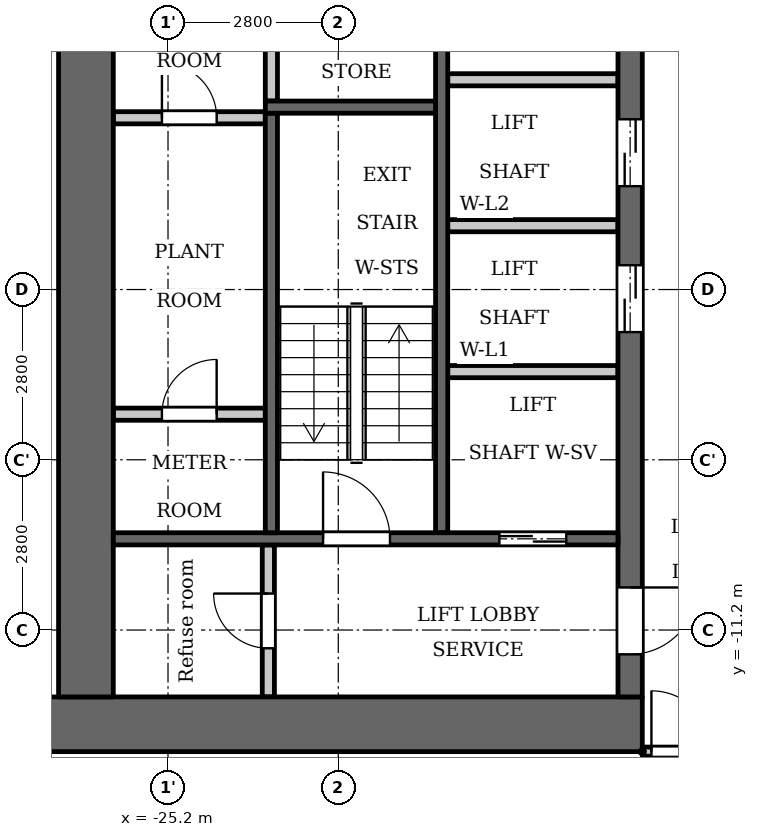
"""IFC4 building model, lengths in metres.
Left out: names, types, materials, properties, quantities, classifications, styles, units other than length and angle.
Written with IfcOpenShell. Run it as: python <this file> out.ifc"""

import sys

from ifc_helpers import new_model, si_unit, direction, frame, frame_2d, origin, place, context, subcontext, project, spatial, rectangle, extrude, element, fill, save


model = new_model("IFC4")
c1 = context("Model", 3, precision=1e-05, world=origin(), true_north=direction((0.0, 1.0)))
c2 = subcontext(c1, "Body", "Model", "MODEL_VIEW")
j1 = project(units=[si_unit("LENGTHUNIT", "METRE"), si_unit("PLANEANGLEUNIT", "RADIAN")], contexts=[c1])
p1 = place(None, origin())
s1 = spatial("IfcSite", under=j1, at=p1, CompositionType="ELEMENT")
p2 = place(p1, origin())
s2 = spatial("IfcBuilding", under=s1, at=p2, CompositionType="ELEMENT")
p3 = place(p2, frame((0.0, 0.0, 86.8)))
s3 = spatial("IfcBuildingStorey", under=s2, at=p3, CompositionType="ELEMENT", Elevation=86.8)
p4 = place(p3, frame((-23.5, -2.5, 0.0), z_axis=(0.0, 0.0, 1.0), x_axis=(0.0, 1.0, 0.0)))
e1 = element("IfcWall", 1, at=p4, inside=s3, PredefinedType="PARTITIONING", context=c2, shape_type="SweptSolid", body=[
    extrude(rectangle(XDim=2.65, YDim=0.2, at=frame_2d((1.325, 0.0))), origin(), (0.0, 0.0, 1.0), 3.2),
])
p5 = place(p3, frame((-20.7, -9.6, 0.0), z_axis=(0.0, 0.0, 1.0), x_axis=(0.0, 1.0, 0.0)))
e2 = element("IfcWall", 2, at=p5, inside=s3, PredefinedType="SHEAR", context=c2, shape_type="SweptSolid", body=[
    extrude(rectangle(XDim=9.75, YDim=0.2, at=frame_2d((4.875, 0.0))), origin(), (0.0, 0.0, 1.0), 3.2),
])
p6 = place(p3, frame((-17.4, -12.75, 0.0), z_axis=(0.0, 0.0, 1.0), x_axis=(-1.0, 0.0, 0.0)))
e3 = element("IfcWall", 3, at=p6, inside=s3, PredefinedType="SHEAR", context=c2, shape_type="SweptSolid", body=[
    extrude(rectangle(XDim=10.4, YDim=0.9, at=frame_2d((5.2, 0.0))), origin(), (0.0, 0.0, 1.0), 3.2),
])
p7 = place(p3, frame((-17.6, -12.3, 0.0), z_axis=(0.0, 0.0, 1.0), x_axis=(0.0, 1.0, 0.0)))
e4 = element("IfcWall", 4, at=p7, inside=s3, PredefinedType="SHEAR", context=c2, shape_type="SweptSolid", body=[
    extrude(rectangle(XDim=24.6, YDim=0.4, at=frame_2d((12.3, 0.0))), origin(), (0.0, 0.0, 1.0), 3.2),
])
p8 = place(p7, frame((6.0, 0.0, 0.0)))
e5 = element("IfcOpeningElement", 5, at=p8, cuts=e4, PredefinedType="OPENING", context=c2, shape_type="SweptSolid", body=[
    extrude(rectangle(XDim=1.1, YDim=2.1, at=frame_2d((0.55, 1.05))), frame((0.0, 0.21, 0.0), z_axis=(0.0, -1.0, 0.0), x_axis=(1.0, 0.0, 0.0)), (0.0, 0.0, 1.0), 0.42),
])
p9 = place(p7, frame((8.4, 0.0, 0.0)))
e6 = element("IfcOpeningElement", 6, at=p9, cuts=e4, PredefinedType="OPENING", context=c2, shape_type="SweptSolid", body=[
    extrude(rectangle(XDim=1.1, YDim=2.1, at=frame_2d((0.55, 1.05))), frame((0.0, 0.21, 0.0), z_axis=(0.0, -1.0, 0.0), x_axis=(1.0, 0.0, 0.0)), (0.0, 0.0, 1.0), 0.42),
])
p10 = place(p7, frame((10.8, 0.0, 0.0)))
e7 = element("IfcOpeningElement", 7, at=p10, cuts=e4, PredefinedType="OPENING", context=c2, shape_type="SweptSolid", body=[
    extrude(rectangle(XDim=1.1, YDim=2.1, at=frame_2d((0.55, 1.05))), frame((0.0, 0.21, 0.0), z_axis=(0.0, -1.0, 0.0), x_axis=(1.0, 0.0, 0.0)), (0.0, 0.0, 1.0), 0.42),
])
p11 = place(p7, frame((16.75, 0.0, 0.0)))
e8 = element("IfcOpeningElement", 8, at=p11, cuts=e4, PredefinedType="OPENING", context=c2, shape_type="SweptSolid", body=[
    extrude(rectangle(XDim=0.9, YDim=2.1, at=frame_2d((0.45, 1.05))), frame((0.0, 0.21, 0.0), z_axis=(0.0, -1.0, 0.0), x_axis=(1.0, 0.0, 0.0)), (0.0, 0.0, 1.0), 0.42),
])
p12 = place(p7, frame((22.8, 0.0, 0.0)))
e9 = element("IfcOpeningElement", 9, at=p12, cuts=e4, PredefinedType="OPENING", context=c2, shape_type="SweptSolid", body=[
    extrude(rectangle(XDim=1.1, YDim=2.1, at=frame_2d((0.55, 1.05))), frame((0.0, 0.21, 0.0), z_axis=(0.0, -1.0, 0.0), x_axis=(1.0, 0.0, 0.0)), (0.0, 0.0, 1.0), 0.42),
])
p13 = place(p7, frame((0.7, 0.0, 0.0)))
e10 = element("IfcOpeningElement", 10, at=p13, cuts=e4, PredefinedType="OPENING", context=c2, shape_type="SweptSolid", body=[
    extrude(rectangle(XDim=1.1, YDim=2.1, at=frame_2d((0.55, 1.05))), frame((0.0, 0.21, 0.0), z_axis=(0.0, -1.0, 0.0), x_axis=(1.0, 0.0, 0.0)), (0.0, 0.0, 1.0), 0.42),
])
p14 = place(p7, frame((12.775, 0.0, 0.0)))
e11 = element("IfcOpeningElement", 11, at=p14, cuts=e4, PredefinedType="OPENING", context=c2, shape_type="SweptSolid", body=[
    extrude(rectangle(XDim=1.8, YDim=2.1, at=frame_2d((0.9, 1.05))), frame((0.0, 0.21, 0.0), z_axis=(0.0, -1.0, 0.0), x_axis=(1.0, 0.0, 0.0)), (0.0, 0.0, 1.0), 0.42),
])
p15 = place(p3, frame((-26.55, -12.3, 0.0), z_axis=(0.0, 0.0, 1.0), x_axis=(0.0, 1.0, 0.0)))
e12 = element("IfcWall", 12, at=p15, inside=s3, PredefinedType="SHEAR", context=c2, shape_type="SweptSolid", body=[
    extrude(rectangle(XDim=24.6, YDim=0.9, at=frame_2d((12.3, 0.0))), origin(), (0.0, 0.0, 1.0), 3.2),
])
p16 = place(p3, frame((-23.55, -12.3, 0.0), z_axis=(0.0, 0.0, 1.0), x_axis=(0.0, 1.0, 0.0)))
e13 = element("IfcWall", 13, at=p16, inside=s3, PredefinedType="PARTITIONING", context=c2, shape_type="SweptSolid", body=[
    extrude(rectangle(XDim=2.5, YDim=0.2, at=frame_2d((1.25, 0.0))), origin(), (0.0, 0.0, 1.0), 3.2),
])
p17 = place(p16, frame((0.8, 0.0, 0.0)))
e14 = element("IfcOpeningElement", 14, at=p17, cuts=e13, PredefinedType="OPENING", context=c2, shape_type="SweptSolid", body=[
    extrude(rectangle(XDim=0.9, YDim=2.1, at=frame_2d((0.45, 1.05))), frame((0.0, 0.11, 0.0), z_axis=(0.0, -1.0, 0.0), x_axis=(1.0, 0.0, 0.0)), (0.0, 0.0, 1.0), 0.22),
])
p18 = place(p3, frame((-23.6, -7.65, 0.0), z_axis=(0.0, 0.0, 1.0), x_axis=(-1.0, 0.0, 0.0)))
e15 = element("IfcWall", 15, at=p18, inside=s3, PredefinedType="PARTITIONING", context=c2, shape_type="SweptSolid", body=[
    extrude(rectangle(XDim=2.5, YDim=0.2, at=frame_2d((1.25, 0.0))), origin(), (0.0, 0.0, 1.0), 3.2),
])
p19 = place(p18, frame((0.8, 0.0, 0.0)))
e16 = element("IfcOpeningElement", 16, at=p19, cuts=e15, PredefinedType="OPENING", context=c2, shape_type="SweptSolid", body=[
    extrude(rectangle(XDim=0.9, YDim=2.1, at=frame_2d((0.45, 1.05))), frame((0.0, 0.11, 0.0), z_axis=(0.0, -1.0, 0.0), x_axis=(1.0, 0.0, 0.0)), (0.0, 0.0, 1.0), 0.22),
])
p20 = place(p3, frame((-23.6, -2.775, 0.0), z_axis=(0.0, 0.0, 1.0), x_axis=(-1.0, 0.0, 0.0)))
e17 = element("IfcWall", 17, at=p20, inside=s3, PredefinedType="PARTITIONING", context=c2, shape_type="SweptSolid", body=[
    extrude(rectangle(XDim=2.5, YDim=0.2, at=frame_2d((1.25, 0.0))), origin(), (0.0, 0.0, 1.0), 3.2),
])
p21 = place(p20, frame((0.8, 0.0, 0.0)))
e18 = element("IfcOpeningElement", 18, at=p21, cuts=e17, PredefinedType="OPENING", context=c2, shape_type="SweptSolid", body=[
    extrude(rectangle(XDim=0.9, YDim=2.1, at=frame_2d((0.45, 1.05))), frame((0.0, 0.11, 0.0), z_axis=(0.0, -1.0, 0.0), x_axis=(1.0, 0.0, 0.0)), (0.0, 0.0, 1.0), 0.22),
])
p22 = place(p3, frame((-17.8, -9.7, 0.0), z_axis=(0.0, 0.0, 1.0), x_axis=(-1.0, 0.0, 0.0)))
e19 = element("IfcWall", 19, at=p22, inside=s3, PredefinedType="SHEAR", context=c2, shape_type="SweptSolid", body=[
    extrude(rectangle(XDim=8.3, YDim=0.2, at=frame_2d((4.15, 0.0))), origin(), (0.0, 0.0, 1.0), 3.2),
])
p23 = place(p22, frame((0.85, 0.0, 0.0)))
e20 = element("IfcOpeningElement", 20, at=p23, cuts=e19, PredefinedType="OPENING", context=c2, shape_type="SweptSolid", body=[
    extrude(rectangle(XDim=1.1, YDim=2.1, at=frame_2d((0.55, 1.05))), frame((0.0, 0.11, 0.0), z_axis=(0.0, -1.0, 0.0), x_axis=(1.0, 0.0, 0.0)), (0.0, 0.0, 1.0), 0.22),
])
p24 = place(p22, frame((3.75, 0.0, 0.0)))
e21 = element("IfcOpeningElement", 21, at=p24, cuts=e19, PredefinedType="OPENING", context=c2, shape_type="SweptSolid", body=[
    extrude(rectangle(XDim=1.1, YDim=2.1, at=frame_2d((0.55, 1.05))), frame((0.0, 0.11, 0.0), z_axis=(0.0, -1.0, 0.0), x_axis=(1.0, 0.0, 0.0)), (0.0, 0.0, 1.0), 0.22),
])
for number, where, z_axis, x_axis in (
    (22, (-17.8, -6.95, 0.0), (0.0, 0.0, 1.0), (-1.0, 0.0, 0.0)),
    (23, (-17.8, -4.55, 0.0), (0.0, 0.0, 1.0), (-1.0, 0.0, 0.0)),
    (24, (-17.8, -2.15, 0.0), (0.0, 0.0, 1.0), (-1.0, 0.0, 0.0)),
):
    element("IfcWall", number, at=place(p3, frame(where, z_axis=z_axis, x_axis=x_axis)), inside=s3, PredefinedType="PARTITIONING", context=c2, shape_type="SweptSolid", body=[
        extrude(rectangle(XDim=2.8, YDim=0.2, at=frame_2d((1.4, 0.0))), origin(), (0.0, 0.0, 1.0), 3.2),
    ])
p25 = place(p3, frame((-23.5, -9.6, 0.0), z_axis=(0.0, 0.0, 1.0), x_axis=(0.0, 1.0, 0.0)))
e25 = element("IfcWall", 25, at=p25, inside=s3, PredefinedType="SHEAR", context=c2, shape_type="SweptSolid", body=[
    extrude(rectangle(XDim=6.9, YDim=0.2, at=frame_2d((3.45, 0.0))), origin(), (0.0, 0.0, 1.0), 3.2),
])
p26 = place(p3, frame((-20.8, -2.6, 0.0), z_axis=(0.0, 0.0, 1.0), x_axis=(-1.0, 0.0, 0.0)))
e26 = element("IfcWall", 26, at=p26, inside=s3, PredefinedType="SHEAR", context=c2, shape_type="SweptSolid", body=[
    extrude(rectangle(XDim=2.8, YDim=0.2, at=frame_2d((1.4, 0.0))), origin(), (0.0, 0.0, 1.0), 3.2),
])
p27 = place(p3, frame((-17.4, -13.2, 0.0), z_axis=(0.0, 0.0, 1.0), x_axis=(1.0, 0.0, 0.0)))
e27 = element("IfcWall", 27, at=p27, inside=s3, PredefinedType="PARTITIONING", context=c2, shape_type="SweptSolid", body=[
    extrude(rectangle(XDim=34.8, YDim=0.15, at=frame_2d((17.4, 0.0))), origin(), (0.0, 0.0, 1.0), 3.2),
])
p28 = place(p27, frame((0.15, 0.0, 0.0)))
e28 = element("IfcOpeningElement", 28, at=p28, cuts=e27, PredefinedType="OPENING", context=c2, shape_type="SweptSolid", body=[
    extrude(rectangle(XDim=1.0, YDim=2.1, at=frame_2d((0.5, 1.05))), frame((0.0, 0.085, 0.0), z_axis=(0.0, -1.0, 0.0), x_axis=(1.0, 0.0, 0.0)), (0.0, 0.0, 1.0), 0.17),
])
p29 = place(p27, frame((33.55, 0.0, 0.0)))
e29 = element("IfcOpeningElement", 29, at=p29, cuts=e27, PredefinedType="OPENING", context=c2, shape_type="SweptSolid", body=[
    extrude(rectangle(XDim=1.0, YDim=2.1, at=frame_2d((0.5, 1.05))), frame((0.0, 0.085, 0.0), z_axis=(0.0, -1.0, 0.0), x_axis=(1.0, 0.0, 0.0)), (0.0, 0.0, 1.0), 0.17),
])
p30 = place(p27, frame((7.35, 0.0, 0.0)))
e30 = element("IfcOpeningElement", 30, at=p30, cuts=e27, PredefinedType="OPENING", context=c2, shape_type="SweptSolid", body=[
    extrude(rectangle(XDim=1.0, YDim=2.1, at=frame_2d((0.5, 1.05))), frame((0.0, 0.085, 0.0), z_axis=(0.0, -1.0, 0.0), x_axis=(1.0, 0.0, 0.0)), (0.0, 0.0, 1.0), 0.17),
])
p31 = place(p27, frame((13.7, 0.0, 0.0)))
e31 = element("IfcOpeningElement", 31, at=p31, cuts=e27, PredefinedType="OPENING", context=c2, shape_type="SweptSolid", body=[
    extrude(rectangle(XDim=1.0, YDim=2.1, at=frame_2d((0.5, 1.05))), frame((0.0, 0.085, 0.0), z_axis=(0.0, -1.0, 0.0), x_axis=(1.0, 0.0, 0.0)), (0.0, 0.0, 1.0), 0.17),
])
p32 = place(p27, frame((19.3, 0.0, 0.0)))
e32 = element("IfcOpeningElement", 32, at=p32, cuts=e27, PredefinedType="OPENING", context=c2, shape_type="SweptSolid", body=[
    extrude(rectangle(XDim=1.0, YDim=2.1, at=frame_2d((0.5, 1.05))), frame((0.0, 0.085, 0.0), z_axis=(0.0, -1.0, 0.0), x_axis=(1.0, 0.0, 0.0)), (0.0, 0.0, 1.0), 0.17),
])
p33 = place(p23, origin())
e33 = element("IfcDoor", 33, at=p33, inside=s3, OperationType="DOUBLE_DOOR_SLIDING", PredefinedType="DOOR", context=c2, shape_type="SweptSolid", body=[
    extrude(rectangle(XDim=1.1, YDim=2.1, at=frame_2d((0.55, 1.05))), frame((0.0, 0.025, 0.0), z_axis=(0.0, -1.0, 0.0), x_axis=(1.0, 0.0, 0.0)), (0.0, 0.0, 1.0), 0.05),
])
fill(e20, e33)
p34 = place(p8, origin())
e34 = element("IfcDoor", 34, at=p34, inside=s3, OperationType="DOUBLE_DOOR_SLIDING", PredefinedType="DOOR", context=c2, shape_type="SweptSolid", body=[
    extrude(rectangle(XDim=1.1, YDim=2.1, at=frame_2d((0.55, 1.05))), frame((0.0, 0.025, 0.0), z_axis=(0.0, -1.0, 0.0), x_axis=(1.0, 0.0, 0.0)), (0.0, 0.0, 1.0), 0.05),
])
fill(e5, e34)
p35 = place(p9, origin())
e35 = element("IfcDoor", 35, at=p35, inside=s3, OperationType="DOUBLE_DOOR_SLIDING", PredefinedType="DOOR", context=c2, shape_type="SweptSolid", body=[
    extrude(rectangle(XDim=1.1, YDim=2.1, at=frame_2d((0.55, 1.05))), frame((0.0, 0.025, 0.0), z_axis=(0.0, -1.0, 0.0), x_axis=(1.0, 0.0, 0.0)), (0.0, 0.0, 1.0), 0.05),
])
fill(e6, e35)
p36 = place(p13, origin())
e36 = element("IfcDoor", 36, at=p36, inside=s3, OperationType="SINGLE_SWING_RIGHT", PredefinedType="DOOR", context=c2, shape_type="SweptSolid", body=[
    extrude(rectangle(XDim=1.1, YDim=2.1, at=frame_2d((0.55, 1.05))), frame((0.0, 0.025, 0.0), z_axis=(0.0, -1.0, 0.0), x_axis=(1.0, 0.0, 0.0)), (0.0, 0.0, 1.0), 0.05),
])
fill(e10, e36)
p37 = place(p17, origin())
e37 = element("IfcDoor", 37, at=p37, inside=s3, OperationType="SINGLE_SWING_LEFT", PredefinedType="DOOR", context=c2, shape_type="SweptSolid", body=[
    extrude(rectangle(XDim=0.9, YDim=2.1, at=frame_2d((0.45, 1.05))), frame((0.0, 0.025, 0.0), z_axis=(0.0, -1.0, 0.0), x_axis=(1.0, 0.0, 0.0)), (0.0, 0.0, 1.0), 0.05),
])
fill(e14, e37)
p38 = place(p24, origin())
e38 = element("IfcDoor", 38, at=p38, inside=s3, OperationType="SINGLE_SWING_RIGHT", PredefinedType="DOOR", context=c2, shape_type="SweptSolid", body=[
    extrude(rectangle(XDim=1.1, YDim=2.1, at=frame_2d((0.55, 1.05))), frame((0.0, 0.025, 0.0), z_axis=(0.0, -1.0, 0.0), x_axis=(1.0, 0.0, 0.0)), (0.0, 0.0, 1.0), 0.05),
])
fill(e21, e38)
p39 = place(p19, origin())
e39 = element("IfcDoor", 39, at=p39, inside=s3, OperationType="SINGLE_SWING_LEFT", PredefinedType="DOOR", context=c2, shape_type="SweptSolid", body=[
    extrude(rectangle(XDim=0.9, YDim=2.1, at=frame_2d((0.45, 1.05))), frame((0.0, 0.025, 0.0), z_axis=(0.0, -1.0, 0.0), x_axis=(1.0, 0.0, 0.0)), (0.0, 0.0, 1.0), 0.05),
])
fill(e16, e39)
p40 = place(p21, origin())
e40 = element("IfcDoor", 40, at=p40, inside=s3, OperationType="SINGLE_SWING_RIGHT", PredefinedType="DOOR", context=c2, shape_type="SweptSolid", body=[
    extrude(rectangle(XDim=0.9, YDim=2.1, at=frame_2d((0.45, 1.05))), frame((0.0, 0.025, 0.0), z_axis=(0.0, -1.0, 0.0), x_axis=(1.0, 0.0, 0.0)), (0.0, 0.0, 1.0), 0.05),
])
fill(e18, e40)
p41 = place(p28, origin())
e41 = element("IfcDoor", 41, at=p41, inside=s3, OperationType="SINGLE_SWING_RIGHT", PredefinedType="DOOR", context=c2, shape_type="SweptSolid", body=[
    extrude(rectangle(XDim=1.0, YDim=2.1, at=frame_2d((0.5, 1.05))), frame((0.0, 0.025, 0.0), z_axis=(0.0, -1.0, 0.0), x_axis=(1.0, 0.0, 0.0)), (0.0, 0.0, 1.0), 0.05),
])
fill(e28, e41)
save(model, sys.argv[1])
